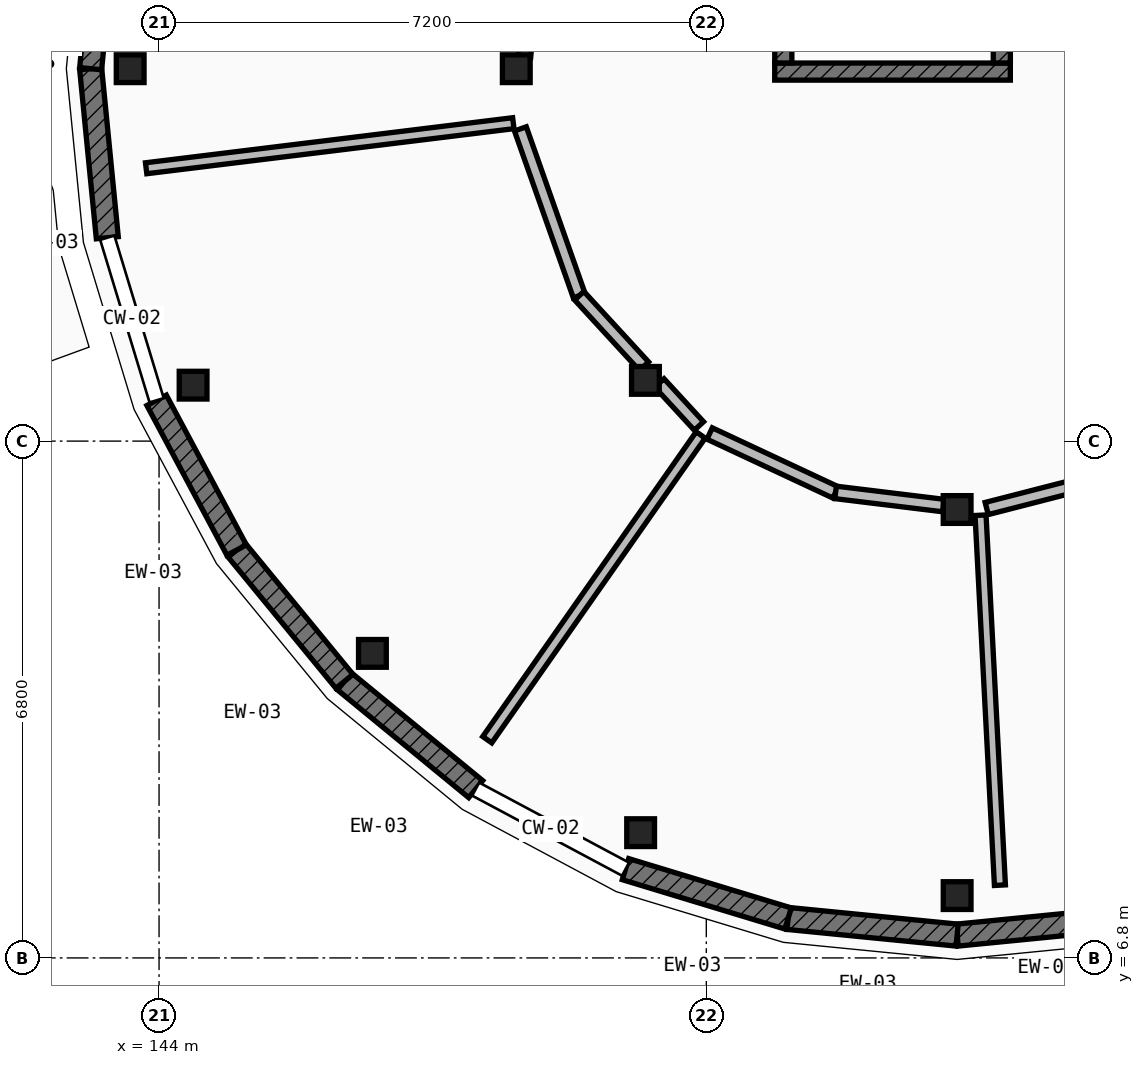
"""IFC4 building model, lengths in metres.
Left out: names, types, materials, properties, quantities, classifications, styles, units other than length and angle.
Written with IfcOpenShell. Run it as: python <this file> out.ifc"""

import sys

from ifc_helpers import new_model, si_unit, direction, frame, frame_2d, origin, origin_2d, place, context, subcontext, project, spatial, rectangle, extrude, element, fill, save


model = new_model("IFC4")
c1 = context("Model", 3, precision=1e-05, world=origin(), true_north=direction((0.0, 1.0)))
c2 = subcontext(c1, "Body", "Model", "MODEL_VIEW")
j1 = project(units=[si_unit("LENGTHUNIT", "METRE"), si_unit("PLANEANGLEUNIT", "RADIAN")], contexts=[c1])
p1 = place(None, origin())
s1 = spatial("IfcSite", under=j1, at=p1, CompositionType="ELEMENT")
p2 = place(p1, origin())
s2 = spatial("IfcBuilding", under=s1, at=p2, CompositionType="ELEMENT")
p3 = place(p2, frame((0.0, 0.0, 4.55)))
s3 = spatial("IfcBuildingStorey", under=s2, at=p3, CompositionType="ELEMENT", Elevation=4.55)
for number, where, z_axis, x_axis in (
    (1, (143.62, 18.5, 0.0), (0.0, 0.0, 1.0), (1.0, 0.0, 0.0)),
    (2, (144.448, 14.336, 0.0), (0.0, 0.0, 1.0), (1.0, 0.0, 0.0)),
    (3, (146.807, 10.807, 0.0), (0.0, 0.0, 1.0), (1.0, 0.0, 0.0)),
    (4, (150.336, 8.448, 0.0), (0.0, 0.0, 1.0), (1.0, 0.0, 0.0)),
    (5, (154.5, 7.62, 0.0), (0.0, 0.0, 1.0), (1.0, 0.0, 0.0)),
    (6, (148.7, 18.5, 0.0), (0.0, 0.0, 1.0), (1.0, 0.0, 0.0)),
    (7, (150.399, 14.399, 0.0), (0.0, 0.0, 1.0), (1.0, 0.0, 0.0)),
    (8, (154.5, 12.7, 0.0), (0.0, 0.0, 1.0), (1.0, 0.0, 0.0)),
):
    element("IfcColumn", number, at=place(p3, frame(where, z_axis=z_axis, x_axis=x_axis)), inside=s3, PredefinedType="COLUMN", context=c2, shape_type="SweptSolid", body=[
        extrude(rectangle(XDim=0.365, YDim=0.365, at=origin_2d()), origin(), (0.0, 0.0, 1.0), 4.2),
    ])
p4 = place(p3, frame((156.724, 7.319, 0.0), z_axis=(0.0, 0.0, 1.0), x_axis=(-0.995187461503, -0.097989369151, 0.0)))
e9 = element("IfcWall", 9, at=p4, inside=s3, PredefinedType="ELEMENTEDWALL", context=c2, shape_type="SweptSolid", body=[
    extrude(rectangle(XDim=2.235, YDim=0.29, at=frame_2d((1.117, 0.0))), origin(), (0.0, 0.0, 1.0), 3.309),
])
p5 = place(p4, frame((0.342, 0.0, 0.85)))
e10 = element("IfcOpeningElement", 10, at=p5, cuts=e9, PredefinedType="OPENING", context=c2, shape_type="SweptSolid", body=[
    extrude(rectangle(XDim=1.55, YDim=1.5, at=frame_2d((0.775, 0.75))), frame((0.0, 0.155, 0.0), z_axis=(0.0, -1.0, 0.0), x_axis=(1.0, 0.0, 0.0)), (0.0, 0.0, 1.0), 0.31),
])
p6 = place(p3, frame((154.5, 7.1, 0.0), z_axis=(0.0, 0.0, 1.0), x_axis=(-0.995187461503, 0.097989369151, 0.0)))
e11 = element("IfcWall", 11, at=p6, inside=s3, PredefinedType="ELEMENTEDWALL", context=c2, shape_type="SweptSolid", body=[
    extrude(rectangle(XDim=2.235, YDim=0.29, at=frame_2d((1.117, 0.0))), origin(), (0.0, 0.0, 1.0), 3.309),
])
p7 = place(p6, frame((0.342, 0.0, 0.85)))
e12 = element("IfcOpeningElement", 12, at=p7, cuts=e11, PredefinedType="OPENING", context=c2, shape_type="SweptSolid", body=[
    extrude(rectangle(XDim=1.55, YDim=1.8, at=frame_2d((0.775, 0.9))), frame((0.0, 0.155, 0.0), z_axis=(0.0, -1.0, 0.0), x_axis=(1.0, 0.0, 0.0)), (0.0, 0.0, 1.0), 0.31),
])
p8 = place(p3, frame((152.276, 7.319, 0.0), z_axis=(0.0, 0.0, 1.0), x_axis=(-0.956928814218, 0.290322655883, 0.0)))
e13 = element("IfcWall", 13, at=p8, inside=s3, PredefinedType="ELEMENTEDWALL", context=c2, shape_type="SweptSolid", body=[
    extrude(rectangle(XDim=2.235, YDim=0.29, at=frame_2d((1.118, 0.0))), origin(), (0.0, 0.0, 1.0), 3.309),
])
p9 = place(p8, frame((0.318, 0.0, 0.85)))
e14 = element("IfcOpeningElement", 14, at=p9, cuts=e13, PredefinedType="OPENING", context=c2, shape_type="SweptSolid", body=[
    extrude(rectangle(XDim=1.6, YDim=1.55, at=frame_2d((0.8, 0.775))), frame((0.0, 0.155, 0.0), z_axis=(0.0, -1.0, 0.0), x_axis=(1.0, 0.0, 0.0)), (0.0, 0.0, 1.0), 0.31),
])
p10 = place(p3, frame((148.166, 9.021, 0.0), z_axis=(0.0, 0.0, 1.0), x_axis=(-0.772875513354, 0.63455767339, 0.0)))
e15 = element("IfcWall", 15, at=p10, inside=s3, PredefinedType="ELEMENTEDWALL", context=c2, shape_type="SweptSolid", body=[
    extrude(rectangle(XDim=2.235, YDim=0.29, at=frame_2d((1.117, 0.0))), origin(), (0.0, 0.0, 1.0), 3.309),
])
p11 = place(p10, frame((0.317, 0.0, 0.85)))
e16 = element("IfcOpeningElement", 16, at=p11, cuts=e15, PredefinedType="OPENING", context=c2, shape_type="SweptSolid", body=[
    extrude(rectangle(XDim=1.6, YDim=1.85, at=frame_2d((0.8, 0.925))), frame((0.0, 0.155, 0.0), z_axis=(0.0, -1.0, 0.0), x_axis=(1.0, 0.0, 0.0)), (0.0, 0.0, 1.0), 0.31),
])
p12 = place(p3, frame((146.439, 10.439, 0.0), z_axis=(0.0, 0.0, 1.0), x_axis=(-0.63455767339, 0.772875513354, 0.0)))
e17 = element("IfcWall", 17, at=p12, inside=s3, PredefinedType="ELEMENTEDWALL", context=c2, shape_type="SweptSolid", body=[
    extrude(rectangle(XDim=2.235, YDim=0.29, at=frame_2d((1.117, 0.0))), origin(), (0.0, 0.0, 1.0), 3.309),
])
p13 = place(p12, frame((0.707, 0.0, 0.85)))
e18 = element("IfcOpeningElement", 18, at=p13, cuts=e17, PredefinedType="OPENING", context=c2, shape_type="SweptSolid", body=[
    extrude(rectangle(XDim=0.82, YDim=1.45, at=frame_2d((0.41, 0.725))), frame((0.0, 0.155, 0.0), z_axis=(0.0, -1.0, 0.0), x_axis=(1.0, 0.0, 0.0)), (0.0, 0.0, 1.0), 0.31),
])
p14 = place(p3, frame((145.021, 12.166, 0.0), z_axis=(0.0, 0.0, 1.0), x_axis=(-0.471217561446, 0.882017012185, 0.0)))
e19 = element("IfcWall", 19, at=p14, inside=s3, PredefinedType="ELEMENTEDWALL", context=c2, shape_type="SweptSolid", body=[
    extrude(rectangle(XDim=2.235, YDim=0.29, at=frame_2d((1.117, 0.0))), origin(), (0.0, 0.0, 1.0), 3.309),
])
p15 = place(p14, frame((0.692, 0.0, 0.85)))
e20 = element("IfcOpeningElement", 20, at=p15, cuts=e19, PredefinedType="OPENING", context=c2, shape_type="SweptSolid", body=[
    extrude(rectangle(XDim=0.85, YDim=1.5, at=frame_2d((0.425, 0.75))), frame((0.0, 0.155, 0.0), z_axis=(0.0, -1.0, 0.0), x_axis=(1.0, 0.0, 0.0)), (0.0, 0.0, 1.0), 0.31),
])
p16 = place(p3, frame((143.319, 16.276, 0.0), z_axis=(0.0, 0.0, 1.0), x_axis=(-0.097989369151, 0.995187461503, 0.0)))
e21 = element("IfcWall", 21, at=p16, inside=s3, PredefinedType="ELEMENTEDWALL", context=c2, shape_type="SweptSolid", body=[
    extrude(rectangle(XDim=2.235, YDim=0.29, at=frame_2d((1.117, 0.0))), origin(), (0.0, 0.0, 1.0), 3.309),
])
p17 = place(p16, frame((0.692, 0.0, 0.85)))
e22 = element("IfcOpeningElement", 22, at=p17, cuts=e21, PredefinedType="OPENING", context=c2, shape_type="SweptSolid", body=[
    extrude(rectangle(XDim=0.85, YDim=1.75, at=frame_2d((0.425, 0.875))), frame((0.0, 0.155, 0.0), z_axis=(0.0, -1.0, 0.0), x_axis=(1.0, 0.0, 0.0)), (0.0, 0.0, 1.0), 0.31),
])
p18 = place(p3, frame((143.1, 18.5, 0.0), z_axis=(0.0, 0.0, 1.0), x_axis=(0.097989369151, 0.995187461503, 0.0)))
e23 = element("IfcWall", 23, at=p18, inside=s3, PredefinedType="ELEMENTEDWALL", context=c2, shape_type="SweptSolid", body=[
    extrude(rectangle(XDim=2.235, YDim=0.29, at=frame_2d((1.117, 0.0))), origin(), (0.0, 0.0, 1.0), 3.309),
])
p19 = place(p18, frame((0.677, 0.0, 0.85)))
e24 = element("IfcOpeningElement", 24, at=p19, cuts=e23, PredefinedType="OPENING", context=c2, shape_type="SweptSolid", body=[
    extrude(rectangle(XDim=0.88, YDim=1.6, at=frame_2d((0.44, 0.8))), frame((0.0, 0.155, 0.0), z_axis=(0.0, -1.0, 0.0), x_axis=(1.0, 0.0, 0.0)), (0.0, 0.0, 1.0), 0.31),
])
p20 = place(p3, frame((152.1, 18.462, 0.0), z_axis=(0.0, 0.0, 1.0), x_axis=(1.0, 0.0, 0.0)))
e25 = element("IfcWall", 25, at=p20, inside=s3, PredefinedType="SHEAR", context=c2, shape_type="SweptSolid", body=[
    extrude(rectangle(XDim=3.1, YDim=0.225, at=frame_2d((1.55, 0.0))), origin(), (0.0, 0.0, 1.0), 3.955),
])
p21 = place(p20, frame((0.95, 0.0, 0.0)))
e26 = element("IfcOpeningElement", 26, at=p21, cuts=e25, PredefinedType="OPENING", context=c2, shape_type="SweptSolid", body=[
    extrude(rectangle(XDim=1.2, YDim=2.2, at=frame_2d((0.6, 1.1))), frame((0.0, 0.123, 0.0), z_axis=(0.0, -1.0, 0.0), x_axis=(1.0, 0.0, 0.0)), (0.0, 0.0, 1.0), 0.245),
])
for number, where, z_axis, x_axis in (
    (27, (152.213, 18.575, 0.0), (0.0, 0.0, 1.0), (0.0, 1.0, 0.0)),
    (28, (155.088, 18.575, 0.0), (0.0, 0.0, 1.0), (0.0, 1.0, 0.0)),
):
    element("IfcWall", number, at=place(p3, frame(where, z_axis=z_axis, x_axis=x_axis)), inside=s3, PredefinedType="SHEAR", context=c2, shape_type="SweptSolid", body=[
        extrude(rectangle(XDim=2.15, YDim=0.225, at=frame_2d((1.075, 0.0))), origin(), (0.0, 0.0, 1.0), 3.955),
    ])
p22 = place(p3, frame((148.661, 17.783, 0.0), z_axis=(0.0, 0.0, 1.0), x_axis=(-0.992549416304, -0.121842751918, 0.0)))
e29 = element("IfcWall", 29, at=p22, inside=s3, PredefinedType="PARTITIONING", context=c2, shape_type="SweptSolid", body=[
    extrude(rectangle(XDim=4.867, YDim=0.145, at=frame_2d((2.434, 0.0))), origin(), (0.0, 0.0, 1.0), 3.284),
])
p23 = place(p3, frame((151.126, 13.681, 0.0), z_axis=(0.0, 0.0, 1.0), x_axis=(-0.573579487823, -0.819149907617, 0.0)))
e30 = element("IfcWall", 30, at=p23, inside=s3, PredefinedType="PARTITIONING", context=c2, shape_type="SweptSolid", body=[
    extrude(rectangle(XDim=4.895, YDim=0.145, at=frame_2d((2.448, 0.0))), origin(), (0.0, 0.0, 1.0), 3.284),
])
p24 = place(p3, frame((154.808, 12.625, 0.0), z_axis=(0.0, 0.0, 1.0), x_axis=(0.05228807127, -0.998632043148, 0.0)))
e31 = element("IfcWall", 31, at=p24, inside=s3, PredefinedType="PARTITIONING", context=c2, shape_type="SweptSolid", body=[
    extrude(rectangle(XDim=4.875, YDim=0.145, at=frame_2d((2.437, 0.0))), origin(), (0.0, 0.0, 1.0), 3.284),
])
p25 = place(p3, frame((148.953, 20.196, 0.0), z_axis=(0.0, 0.0, 1.0), x_axis=(-0.094258636882, -0.995547743392, 0.0)))
e32 = element("IfcWall", 32, at=p25, inside=s3, PredefinedType="PARTITIONING", context=c2, shape_type="SweptSolid", body=[
    extrude(rectangle(XDim=1.549, YDim=0.165, at=frame_2d((0.774, 0.0))), origin(), (0.0, 0.0, 1.0), 3.284),
])
p26 = place(p3, frame((148.754, 17.708, 0.0), z_axis=(0.0, 0.0, 1.0), x_axis=(0.332606133603, -0.943065830093, 0.0)))
e33 = element("IfcWall", 33, at=p26, inside=s3, PredefinedType="PARTITIONING", context=c2, shape_type="SweptSolid", body=[
    extrude(rectangle(XDim=2.328, YDim=0.165, at=frame_2d((1.164, 0.0))), origin(), (0.0, 0.0, 1.0), 3.284),
])
p27 = place(p26, frame((0.569, 0.0, 0.0)))
e34 = element("IfcOpeningElement", 34, at=p27, cuts=e33, PredefinedType="OPENING", context=c2, shape_type="SweptSolid", body=[
    extrude(rectangle(XDim=1.19, YDim=2.26, at=frame_2d((0.595, 1.13))), frame((0.0, 0.093, 0.0), z_axis=(0.0, -1.0, 0.0), x_axis=(1.0, 0.0, 0.0)), (0.0, 0.0, 1.0), 0.185),
])
p28 = place(p3, frame((149.528, 15.513, 0.0), z_axis=(0.0, 0.0, 1.0), x_axis=(0.676611080709, -0.736340577085, 0.0)))
e35 = element("IfcWall", 35, at=p28, inside=s3, PredefinedType="PARTITIONING", context=c2, shape_type="SweptSolid", body=[
    extrude(rectangle(XDim=1.259, YDim=0.165, at=frame_2d((0.629, 0.0))), origin(), (0.0, 0.0, 1.0), 3.284),
])
p29 = place(p3, frame((150.583, 14.365, 0.0), z_axis=(0.0, 0.0, 1.0), x_axis=(0.676615979647, -0.736336075503, 0.0)))
e36 = element("IfcWall", 36, at=p29, inside=s3, PredefinedType="PARTITIONING", context=c2, shape_type="SweptSolid", body=[
    extrude(rectangle(XDim=0.769, YDim=0.165, at=frame_2d((0.384, 0.0))), origin(), (0.0, 0.0, 1.0), 3.284),
])
p30 = place(p3, frame((151.244, 13.7, 0.0), z_axis=(0.0, 0.0, 1.0), x_axis=(0.905838456469, -0.423623288763, 0.0)))
e37 = element("IfcWall", 37, at=p30, inside=s3, PredefinedType="PARTITIONING", context=c2, shape_type="SweptSolid", body=[
    extrude(rectangle(XDim=1.829, YDim=0.165, at=frame_2d((0.915, 0.0))), origin(), (0.0, 0.0, 1.0), 3.284),
])
p31 = place(p30, frame((0.31, 0.0, 0.0)))
e38 = element("IfcOpeningElement", 38, at=p31, cuts=e37, PredefinedType="OPENING", context=c2, shape_type="SweptSolid", body=[
    extrude(rectangle(XDim=1.21, YDim=2.16, at=frame_2d((0.605, 1.08))), frame((0.0, 0.093, 0.0), z_axis=(0.0, -1.0, 0.0), x_axis=(1.0, 0.0, 0.0)), (0.0, 0.0, 1.0), 0.185),
])
p32 = place(p3, frame((152.901, 12.925, 0.0), z_axis=(0.0, 0.0, 1.0), x_axis=(0.992643875507, -0.12107079094, 0.0)))
e39 = element("IfcWall", 39, at=p32, inside=s3, PredefinedType="PARTITIONING", context=c2, shape_type="SweptSolid", body=[
    extrude(rectangle(XDim=1.43, YDim=0.165, at=frame_2d((0.715, 0.0))), origin(), (0.0, 0.0, 1.0), 3.284),
])
p33 = place(p3, frame((154.889, 12.713, 0.0), z_axis=(0.0, 0.0, 1.0), x_axis=(0.968515845244, 0.248951918071, 0.0)))
e40 = element("IfcWall", 40, at=p33, inside=s3, PredefinedType="PARTITIONING", context=c2, shape_type="SweptSolid", body=[
    extrude(rectangle(XDim=2.129, YDim=0.165, at=frame_2d((1.064, 0.0))), origin(), (0.0, 0.0, 1.0), 3.284),
])
p34 = place(p33, frame((0.444, 0.0, 0.0)))
e41 = element("IfcOpeningElement", 41, at=p34, cuts=e40, PredefinedType="OPENING", context=c2, shape_type="SweptSolid", body=[
    extrude(rectangle(XDim=1.24, YDim=2.22, at=frame_2d((0.62, 1.11))), frame((0.0, 0.093, 0.0), z_axis=(0.0, -1.0, 0.0), x_axis=(1.0, 0.0, 0.0)), (0.0, 0.0, 1.0), 0.185),
])
p35 = place(p5, origin())
e42 = element("IfcWindow", 42, at=p35, inside=s3, PartitioningType="SINGLE_PANEL", PredefinedType="WINDOW", context=c2, shape_type="SweptSolid", body=[
    extrude(rectangle(XDim=1.55, YDim=1.5, at=frame_2d((0.775, 0.75))), frame((0.0, 0.03, 0.0), z_axis=(0.0, -1.0, 0.0), x_axis=(1.0, 0.0, 0.0)), (0.0, 0.0, 1.0), 0.06),
])
fill(e10, e42)
p36 = place(p7, origin())
e43 = element("IfcWindow", 43, at=p36, inside=s3, PartitioningType="SINGLE_PANEL", PredefinedType="WINDOW", context=c2, shape_type="SweptSolid", body=[
    extrude(rectangle(XDim=1.55, YDim=1.8, at=frame_2d((0.775, 0.9))), frame((0.0, 0.03, 0.0), z_axis=(0.0, -1.0, 0.0), x_axis=(1.0, 0.0, 0.0)), (0.0, 0.0, 1.0), 0.06),
])
fill(e12, e43)
p37 = place(p9, origin())
e44 = element("IfcWindow", 44, at=p37, inside=s3, PartitioningType="SINGLE_PANEL", PredefinedType="WINDOW", context=c2, shape_type="SweptSolid", body=[
    extrude(rectangle(XDim=1.6, YDim=1.55, at=frame_2d((0.8, 0.775))), frame((0.0, 0.03, 0.0), z_axis=(0.0, -1.0, 0.0), x_axis=(1.0, 0.0, 0.0)), (0.0, 0.0, 1.0), 0.06),
])
fill(e14, e44)
p38 = place(p11, origin())
e45 = element("IfcWindow", 45, at=p38, inside=s3, PartitioningType="SINGLE_PANEL", PredefinedType="WINDOW", context=c2, shape_type="SweptSolid", body=[
    extrude(rectangle(XDim=1.6, YDim=1.85, at=frame_2d((0.8, 0.925))), frame((0.0, 0.03, 0.0), z_axis=(0.0, -1.0, 0.0), x_axis=(1.0, 0.0, 0.0)), (0.0, 0.0, 1.0), 0.06),
])
fill(e16, e45)
p39 = place(p13, origin())
e46 = element("IfcWindow", 46, at=p39, inside=s3, PartitioningType="SINGLE_PANEL", PredefinedType="WINDOW", context=c2, shape_type="SweptSolid", body=[
    extrude(rectangle(XDim=0.82, YDim=1.45, at=frame_2d((0.41, 0.725))), frame((0.0, 0.03, 0.0), z_axis=(0.0, -1.0, 0.0), x_axis=(1.0, 0.0, 0.0)), (0.0, 0.0, 1.0), 0.06),
])
fill(e18, e46)
p40 = place(p15, origin())
e47 = element("IfcWindow", 47, at=p40, inside=s3, PartitioningType="SINGLE_PANEL", PredefinedType="WINDOW", context=c2, shape_type="SweptSolid", body=[
    extrude(rectangle(XDim=0.85, YDim=1.5, at=frame_2d((0.425, 0.75))), frame((0.0, 0.03, 0.0), z_axis=(0.0, -1.0, 0.0), x_axis=(1.0, 0.0, 0.0)), (0.0, 0.0, 1.0), 0.06),
])
fill(e20, e47)
p41 = place(p17, origin())
e48 = element("IfcWindow", 48, at=p41, inside=s3, PartitioningType="SINGLE_PANEL", PredefinedType="WINDOW", context=c2, shape_type="SweptSolid", body=[
    extrude(rectangle(XDim=0.85, YDim=1.75, at=frame_2d((0.425, 0.875))), frame((0.0, 0.03, 0.0), z_axis=(0.0, -1.0, 0.0), x_axis=(1.0, 0.0, 0.0)), (0.0, 0.0, 1.0), 0.06),
])
fill(e22, e48)
p42 = place(p21, origin())
e49 = element("IfcDoor", 49, at=p42, inside=s3, OperationType="DOUBLE_DOOR_SLIDING", PredefinedType="DOOR", context=c2, shape_type="SweptSolid", body=[
    extrude(rectangle(XDim=1.2, YDim=2.2, at=frame_2d((0.6, 1.1))), frame((0.0, 0.025, 0.0), z_axis=(0.0, -1.0, 0.0), x_axis=(1.0, 0.0, 0.0)), (0.0, 0.0, 1.0), 0.05),
])
fill(e26, e49)
p43 = place(p27, origin())
e50 = element("IfcDoor", 50, at=p43, inside=s3, OperationType="SINGLE_SWING_LEFT", PredefinedType="DOOR", context=c2, shape_type="SweptSolid", body=[
    extrude(rectangle(XDim=1.19, YDim=2.26, at=frame_2d((0.595, 1.13))), frame((0.0, 0.025, 0.0), z_axis=(0.0, -1.0, 0.0), x_axis=(1.0, 0.0, 0.0)), (0.0, 0.0, 1.0), 0.05),
])
fill(e34, e50)
p44 = place(p31, origin())
e51 = element("IfcDoor", 51, at=p44, inside=s3, OperationType="SINGLE_SWING_RIGHT", PredefinedType="DOOR", context=c2, shape_type="SweptSolid", body=[
    extrude(rectangle(XDim=1.21, YDim=2.16, at=frame_2d((0.605, 1.08))), frame((0.0, 0.025, 0.0), z_axis=(0.0, -1.0, 0.0), x_axis=(1.0, 0.0, 0.0)), (0.0, 0.0, 1.0), 0.05),
])
fill(e38, e51)
p45 = place(p34, origin())
e52 = element("IfcDoor", 52, at=p45, inside=s3, OperationType="SINGLE_SWING_LEFT", PredefinedType="DOOR", context=c2, shape_type="SweptSolid", body=[
    extrude(rectangle(XDim=1.24, YDim=2.22, at=frame_2d((0.62, 1.11))), frame((0.0, 0.025, 0.0), z_axis=(0.0, -1.0, 0.0), x_axis=(1.0, 0.0, 0.0)), (0.0, 0.0, 1.0), 0.05),
])
fill(e41, e52)
save(model, sys.argv[1])
